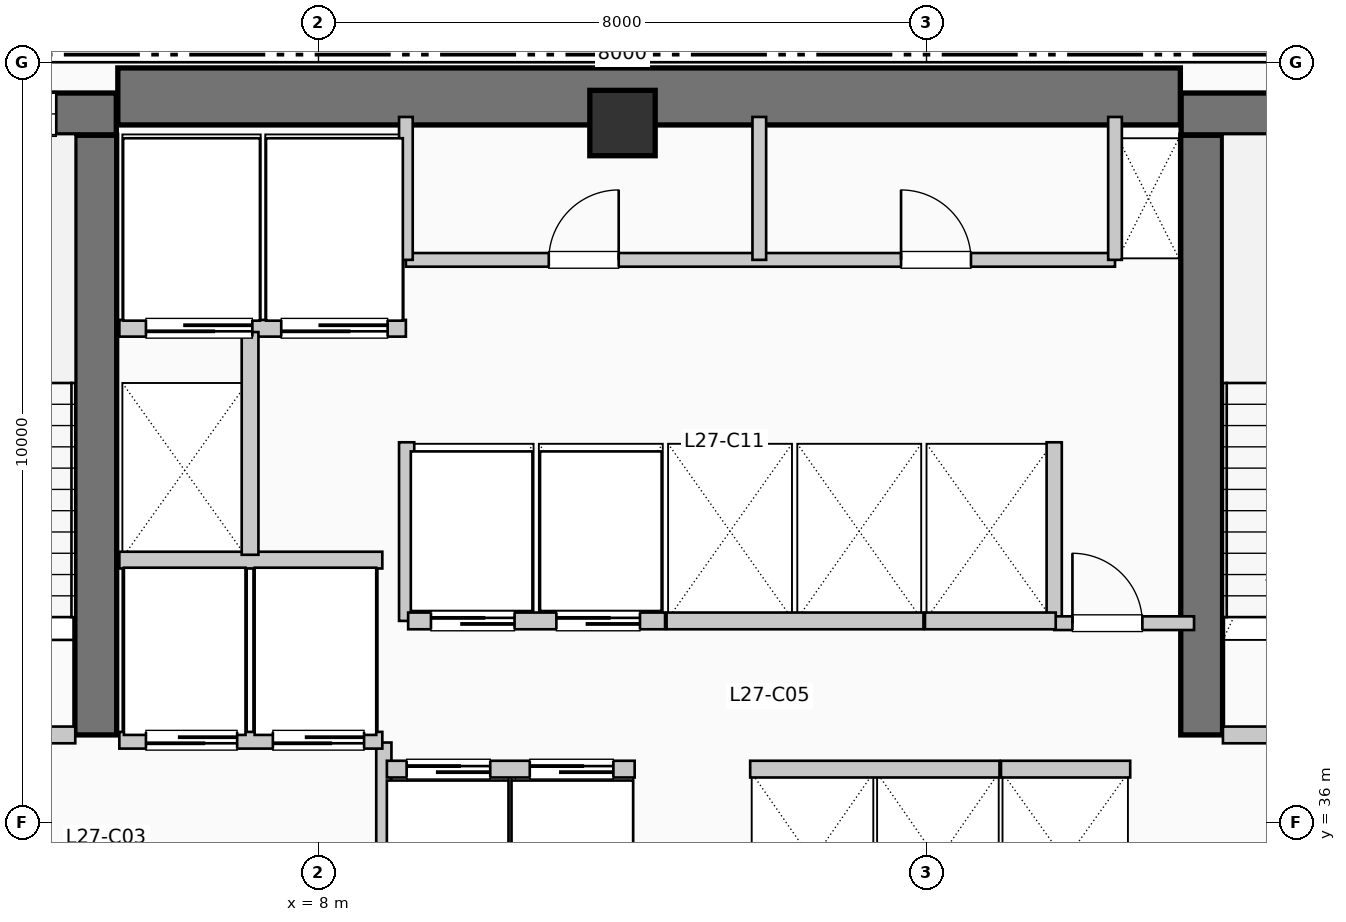
"""IFC4 building model, lengths in metres.
Left out: names, types, materials, properties, quantities, classifications, styles, units other than length and angle.
Written with IfcOpenShell. Run it as: python <this file> out.ifc"""

import sys

from ifc_helpers import new_model, si_unit, direction, frame, frame_2d, origin, origin_2d, place, context, subcontext, project, spatial, rectangle, extrude, element, fill, save


model = new_model("IFC4")
c1 = context("Model", 3, precision=1e-05, world=origin(), true_north=direction((0.0, 1.0)))
c2 = subcontext(c1, "Body", "Model", "MODEL_VIEW")
j1 = project(units=[si_unit("LENGTHUNIT", "METRE"), si_unit("PLANEANGLEUNIT", "RADIAN")], contexts=[c1])
p1 = place(None, origin())
s1 = spatial("IfcSite", under=j1, at=p1, CompositionType="ELEMENT")
p2 = place(p1, origin())
s2 = spatial("IfcBuilding", under=s1, at=p2, CompositionType="ELEMENT")
p3 = place(p2, frame((0.0, 0.0, 114.51)))
s3 = spatial("IfcBuildingStorey", under=s2, at=p3, CompositionType="ELEMENT", Elevation=114.51)
p4 = place(p3, frame((5.36, 45.55, 0.0), z_axis=(0.0, 0.0, 1.0), x_axis=(1.0, 0.0, 0.0)))
e1 = element("IfcWall", 1, at=p4, inside=s3, PredefinedType="SHEAR", context=c2, shape_type="SweptSolid", body=[
    extrude(rectangle(XDim=13.98, YDim=0.75, at=frame_2d((6.99, 0.0))), origin(), (0.0, 0.0, 1.0), 3.96),
])
p5 = place(p3, frame((5.07, 37.15, 0.0), z_axis=(0.0, 0.0, 1.0), x_axis=(0.0, 1.0, 0.0)))
e2 = element("IfcWall", 2, at=p5, inside=s3, PredefinedType="SHEAR", context=c2, shape_type="SweptSolid", body=[
    extrude(rectangle(XDim=7.89, YDim=0.55, at=frame_2d((3.945, 0.0))), origin(), (0.0, 0.0, 1.0), 3.96),
])
p6 = place(p3, frame((1.1, 45.32, 0.0), z_axis=(0.0, 0.0, 1.0), x_axis=(1.0, 0.0, 0.0)))
e3 = element("IfcWall", 3, at=p6, inside=s3, PredefinedType="SHEAR", context=c2, shape_type="SweptSolid", body=[
    extrude(rectangle(XDim=4.24, YDim=0.55, at=frame_2d((2.12, 0.0))), origin(), (0.0, 0.0, 1.0), 3.96),
])
p7 = place(p6, frame((2.05, 0.0, 1.05)))
e4 = element("IfcOpeningElement", 4, at=p7, cuts=e3, PredefinedType="OPENING", context=c2, shape_type="SweptSolid", body=[
    extrude(rectangle(XDim=1.4, YDim=1.8, at=frame_2d((0.7, 0.9))), frame((0.0, 0.285, 0.0), z_axis=(0.0, -1.0, 0.0), x_axis=(1.0, 0.0, 0.0)), (0.0, 0.0, 1.0), 0.57),
])
p8 = place(p3, frame((19.62, 37.15, 0.0), z_axis=(0.0, 0.0, 1.0), x_axis=(0.0, 1.0, 0.0)))
e5 = element("IfcWall", 5, at=p8, inside=s3, PredefinedType="SHEAR", context=c2, shape_type="SweptSolid", body=[
    extrude(rectangle(XDim=7.89, YDim=0.55, at=frame_2d((3.945, 0.0))), origin(), (0.0, 0.0, 1.0), 3.96),
])
p9 = place(p3, frame((19.35, 45.32, 0.0), z_axis=(0.0, 0.0, 1.0), x_axis=(1.0, 0.0, 0.0)))
e6 = element("IfcWall", 6, at=p9, inside=s3, PredefinedType="SHEAR", context=c2, shape_type="SweptSolid", body=[
    extrude(rectangle(XDim=3.69, YDim=0.55, at=frame_2d((1.845, 0.0))), origin(), (0.0, 0.0, 1.0), 3.96),
])
p10 = place(p9, frame((1.15, 0.0, 1.05)))
e7 = element("IfcOpeningElement", 7, at=p10, cuts=e6, PredefinedType="OPENING", context=c2, shape_type="SweptSolid", body=[
    extrude(rectangle(XDim=1.4, YDim=1.8, at=frame_2d((0.7, 0.9))), frame((0.0, 0.285, 0.0), z_axis=(0.0, -1.0, 0.0), x_axis=(1.0, 0.0, 0.0)), (0.0, 0.0, 1.0), 0.57),
])
p11 = place(p3, frame((12.0, 45.2, 0.0), z_axis=(0.0, 0.0, 1.0), x_axis=(1.0, 0.0, 0.0)))
e8 = element("IfcColumn", 8, at=p11, inside=s3, PredefinedType="COLUMN", context=c2, shape_type="SweptSolid", body=[
    extrude(rectangle(XDim=0.86, YDim=0.86, at=origin_2d()), origin(), (0.0, 0.0, 1.0), 3.96),
])
p12 = place(p3, frame((1.65, 37.15, 0.0), z_axis=(0.0, 0.0, 1.0), x_axis=(1.0, 0.0, 0.0)))
e9 = element("IfcWall", 9, at=p12, inside=s3, PredefinedType="PARTITIONING", context=c2, shape_type="SweptSolid", body=[
    extrude(rectangle(XDim=3.15, YDim=0.22, at=frame_2d((1.575, 0.0))), origin(), (0.0, 0.0, 1.0), 3.71),
])
p13 = place(p12, frame((2.05, 0.0, 0.0), z_axis=(0.0, 0.0, 1.0), x_axis=(-1.0, 0.0, 0.0)))
e10 = element("IfcOpeningElement", 10, at=p13, cuts=e9, PredefinedType="OPENING", context=c2, shape_type="SweptSolid", body=[
    extrude(rectangle(XDim=1.05, YDim=2.15, at=frame_2d((0.525, 1.075))), frame((0.0, 0.12, 0.0), z_axis=(0.0, -1.0, 0.0), x_axis=(1.0, 0.0, 0.0)), (0.0, 0.0, 1.0), 0.24),
])
p14 = place(p3, frame((8.86, 34.55, 0.0), z_axis=(0.0, 0.0, 1.0), x_axis=(0.0, 1.0, 0.0)))
e11 = element("IfcWall", 11, at=p14, inside=s3, PredefinedType="PARTITIONING", context=c2, shape_type="SweptSolid", body=[
    extrude(rectangle(XDim=2.5, YDim=0.2, at=frame_2d((1.25, 0.0))), origin(), (0.0, 0.0, 1.0), 3.71),
])
p15 = place(p3, frame((19.9, 37.15, 0.0), z_axis=(0.0, 0.0, 1.0), x_axis=(1.0, 0.0, 0.0)))
e12 = element("IfcWall", 12, at=p15, inside=s3, PredefinedType="PARTITIONING", context=c2, shape_type="SweptSolid", body=[
    extrude(rectangle(XDim=3.15, YDim=0.22, at=frame_2d((1.575, 0.0))), origin(), (0.0, 0.0, 1.0), 3.71),
])
p16 = place(p15, frame((2.05, 0.0, 0.0), z_axis=(0.0, 0.0, 1.0), x_axis=(-1.0, 0.0, 0.0)))
e13 = element("IfcOpeningElement", 13, at=p16, cuts=e12, PredefinedType="OPENING", context=c2, shape_type="SweptSolid", body=[
    extrude(rectangle(XDim=1.05, YDim=2.15, at=frame_2d((0.525, 1.075))), frame((0.0, 0.12, 0.0), z_axis=(0.0, -1.0, 0.0), x_axis=(1.0, 0.0, 0.0)), (0.0, 0.0, 1.0), 0.24),
])
p17 = place(p3, frame((5.38, 37.08, 0.0), z_axis=(0.0, 0.0, 1.0), x_axis=(1.0, 0.0, 0.0)))
e14 = element("IfcWall", 14, at=p17, inside=s3, PredefinedType="PARTITIONING", context=c2, shape_type="SweptSolid", body=[
    extrude(rectangle(XDim=3.46, YDim=0.22, at=frame_2d((1.73, 0.0))), origin(), (0.0, 0.0, 1.0), 3.71),
])
p18 = place(p17, frame((1.55, 0.0, 0.0), z_axis=(0.0, 0.0, 1.0), x_axis=(-1.0, 0.0, 0.0)))
e15 = element("IfcOpeningElement", 15, at=p18, cuts=e14, PredefinedType="OPENING", context=c2, shape_type="SweptSolid", body=[
    extrude(rectangle(XDim=1.2, YDim=2.2, at=frame_2d((0.6, 1.1))), frame((0.0, 0.12, 0.0), z_axis=(0.0, -1.0, 0.0), x_axis=(1.0, 0.0, 0.0)), (0.0, 0.0, 1.0), 0.24),
])
p19 = place(p17, frame((3.22, 0.0, 0.0), z_axis=(0.0, 0.0, 1.0), x_axis=(-1.0, 0.0, 0.0)))
e16 = element("IfcOpeningElement", 16, at=p19, cuts=e14, PredefinedType="OPENING", context=c2, shape_type="SweptSolid", body=[
    extrude(rectangle(XDim=1.2, YDim=2.2, at=frame_2d((0.6, 1.1))), frame((0.0, 0.12, 0.0), z_axis=(0.0, -1.0, 0.0), x_axis=(1.0, 0.0, 0.0)), (0.0, 0.0, 1.0), 0.24),
])
p20 = place(p3, frame((5.38, 39.45, 0.0), z_axis=(0.0, 0.0, 1.0), x_axis=(1.0, 0.0, 0.0)))
e17 = element("IfcWall", 17, at=p20, inside=s3, PredefinedType="PARTITIONING", context=c2, shape_type="SweptSolid", body=[
    extrude(rectangle(XDim=3.46, YDim=0.22, at=frame_2d((1.73, 0.0))), origin(), (0.0, 0.0, 1.0), 3.71),
])
p21 = place(p3, frame((5.38, 42.5, 0.0), z_axis=(0.0, 0.0, 1.0), x_axis=(1.0, 0.0, 0.0)))
e18 = element("IfcWall", 18, at=p21, inside=s3, PredefinedType="PARTITIONING", context=c2, shape_type="SweptSolid", body=[
    extrude(rectangle(XDim=3.77, YDim=0.22, at=frame_2d((1.885, 0.0))), origin(), (0.0, 0.0, 1.0), 3.71),
])
p22 = place(p21, frame((1.75, 0.0, 0.0), z_axis=(0.0, 0.0, 1.0), x_axis=(-1.0, 0.0, 0.0)))
e19 = element("IfcOpeningElement", 19, at=p22, cuts=e18, PredefinedType="OPENING", context=c2, shape_type="SweptSolid", body=[
    extrude(rectangle(XDim=1.4, YDim=2.2, at=frame_2d((0.7, 1.1))), frame((0.0, 0.12, 0.0), z_axis=(0.0, -1.0, 0.0), x_axis=(1.0, 0.0, 0.0)), (0.0, 0.0, 1.0), 0.24),
])
p23 = place(p21, frame((3.53, 0.0, 0.0), z_axis=(0.0, 0.0, 1.0), x_axis=(-1.0, 0.0, 0.0)))
e20 = element("IfcOpeningElement", 20, at=p23, cuts=e18, PredefinedType="OPENING", context=c2, shape_type="SweptSolid", body=[
    extrude(rectangle(XDim=1.4, YDim=2.2, at=frame_2d((0.7, 1.1))), frame((0.0, 0.12, 0.0), z_axis=(0.0, -1.0, 0.0), x_axis=(1.0, 0.0, 0.0)), (0.0, 0.0, 1.0), 0.24),
])
p24 = place(p3, frame((7.1, 39.52, 0.0), z_axis=(0.0, 0.0, 1.0), x_axis=(0.0, 1.0, 0.0)))
e21 = element("IfcWall", 21, at=p24, inside=s3, PredefinedType="PARTITIONING", context=c2, shape_type="SweptSolid", body=[
    extrude(rectangle(XDim=2.93, YDim=0.22, at=frame_2d((1.465, 0.0))), origin(), (0.0, 0.0, 1.0), 3.71),
])
for number, where, z_axis, x_axis in (
    (22, (9.16, 38.65, 0.0), (0.0, 0.0, 1.0), (0.0, 1.0, 0.0)),
    (23, (17.68, 38.65, 0.0), (0.0, 0.0, 1.0), (0.0, 1.0, 0.0)),
):
    element("IfcWall", number, at=place(p3, frame(where, z_axis=z_axis, x_axis=x_axis)), inside=s3, PredefinedType="PARTITIONING", context=c2, shape_type="SweptSolid", body=[
        extrude(rectangle(XDim=2.35, YDim=0.2, at=frame_2d((1.175, 0.0))), origin(), (0.0, 0.0, 1.0), 3.71),
    ])
p25 = place(p3, frame((17.68, 38.62, 0.0), z_axis=(0.0, 0.0, 1.0), x_axis=(1.0, 0.0, 0.0)))
e24 = element("IfcWall", 24, at=p25, inside=s3, PredefinedType="PARTITIONING", context=c2, shape_type="SweptSolid", body=[
    extrude(rectangle(XDim=1.84, YDim=0.18, at=frame_2d((0.92, 0.0))), origin(), (0.0, 0.0, 1.0), 3.71),
])
p26 = place(p25, frame((0.24, 0.0, 0.0)))
e25 = element("IfcOpeningElement", 25, at=p26, cuts=e24, PredefinedType="OPENING", context=c2, shape_type="SweptSolid", body=[
    extrude(rectangle(XDim=0.92, YDim=2.1, at=frame_2d((0.46, 1.05))), frame((0.0, 0.1, 0.0), z_axis=(0.0, -1.0, 0.0), x_axis=(1.0, 0.0, 0.0)), (0.0, 0.0, 1.0), 0.2),
])
p27 = place(p3, frame((8.9, 36.7, 0.0), z_axis=(0.0, 0.0, 1.0), x_axis=(1.0, 0.0, 0.0)))
e26 = element("IfcWall", 26, at=p27, inside=s3, PredefinedType="PARTITIONING", context=c2, shape_type="SweptSolid", body=[
    extrude(rectangle(XDim=3.26, YDim=0.22, at=frame_2d((1.63, 0.0))), origin(), (0.0, 0.0, 1.0), 3.71),
])
p28 = place(p27, frame((0.26, 0.0, 0.0)))
e27 = element("IfcOpeningElement", 27, at=p28, cuts=e26, PredefinedType="OPENING", context=c2, shape_type="SweptSolid", body=[
    extrude(rectangle(XDim=1.1, YDim=2.2, at=frame_2d((0.55, 1.1))), frame((0.0, 0.12, 0.0), z_axis=(0.0, -1.0, 0.0), x_axis=(1.0, 0.0, 0.0)), (0.0, 0.0, 1.0), 0.24),
])
p29 = place(p27, frame((1.88, 0.0, 0.0)))
e28 = element("IfcOpeningElement", 28, at=p29, cuts=e26, PredefinedType="OPENING", context=c2, shape_type="SweptSolid", body=[
    extrude(rectangle(XDim=1.1, YDim=2.2, at=frame_2d((0.55, 1.1))), frame((0.0, 0.12, 0.0), z_axis=(0.0, -1.0, 0.0), x_axis=(1.0, 0.0, 0.0)), (0.0, 0.0, 1.0), 0.24),
])
p30 = place(p3, frame((9.18, 38.65, 0.0), z_axis=(0.0, 0.0, 1.0), x_axis=(1.0, 0.0, 0.0)))
e29 = element("IfcWall", 29, at=p30, inside=s3, PredefinedType="PARTITIONING", context=c2, shape_type="SweptSolid", body=[
    extrude(rectangle(XDim=3.38, YDim=0.22, at=frame_2d((1.69, 0.0))), origin(), (0.0, 0.0, 1.0), 3.71),
])
p31 = place(p30, frame((0.3, 0.0, 0.0)))
e30 = element("IfcOpeningElement", 30, at=p31, cuts=e29, PredefinedType="OPENING", context=c2, shape_type="SweptSolid", body=[
    extrude(rectangle(XDim=1.1, YDim=2.2, at=frame_2d((0.55, 1.1))), frame((0.0, 0.12, 0.0), z_axis=(0.0, -1.0, 0.0), x_axis=(1.0, 0.0, 0.0)), (0.0, 0.0, 1.0), 0.24),
])
p32 = place(p30, frame((1.95, 0.0, 0.0)))
e31 = element("IfcOpeningElement", 31, at=p32, cuts=e29, PredefinedType="OPENING", context=c2, shape_type="SweptSolid", body=[
    extrude(rectangle(XDim=1.1, YDim=2.2, at=frame_2d((0.55, 1.1))), frame((0.0, 0.12, 0.0), z_axis=(0.0, -1.0, 0.0), x_axis=(1.0, 0.0, 0.0)), (0.0, 0.0, 1.0), 0.24),
])
p33 = place(p3, frame((13.68, 36.7, 0.0), z_axis=(0.0, 0.0, 1.0), x_axis=(1.0, 0.0, 0.0)))
e32 = element("IfcWall", 32, at=p33, inside=s3, PredefinedType="PARTITIONING", context=c2, shape_type="SweptSolid", body=[
    extrude(rectangle(XDim=3.28, YDim=0.22, at=frame_2d((1.64, 0.0))), origin(), (0.0, 0.0, 1.0), 3.71),
])
p34 = place(p3, frame((12.58, 38.65, 0.0), z_axis=(0.0, 0.0, 1.0), x_axis=(1.0, 0.0, 0.0)))
e33 = element("IfcWall", 33, at=p34, inside=s3, PredefinedType="PARTITIONING", context=c2, shape_type="SweptSolid", body=[
    extrude(rectangle(XDim=3.38, YDim=0.22, at=frame_2d((1.69, 0.0))), origin(), (0.0, 0.0, 1.0), 3.71),
])
p35 = place(p3, frame((16.98, 36.7, 0.0), z_axis=(0.0, 0.0, 1.0), x_axis=(1.0, 0.0, 0.0)))
e34 = element("IfcWall", 34, at=p35, inside=s3, PredefinedType="PARTITIONING", context=c2, shape_type="SweptSolid", body=[
    extrude(rectangle(XDim=1.7, YDim=0.22, at=frame_2d((0.85, 0.0))), origin(), (0.0, 0.0, 1.0), 3.71),
])
p36 = place(p3, frame((15.98, 38.65, 0.0), z_axis=(0.0, 0.0, 1.0), x_axis=(1.0, 0.0, 0.0)))
e35 = element("IfcWall", 35, at=p36, inside=s3, PredefinedType="PARTITIONING", context=c2, shape_type="SweptSolid", body=[
    extrude(rectangle(XDim=1.72, YDim=0.22, at=frame_2d((0.86, 0.0))), origin(), (0.0, 0.0, 1.0), 3.71),
])
p37 = place(p3, frame((9.15, 43.4, 0.0), z_axis=(0.0, 0.0, 1.0), x_axis=(1.0, 0.0, 0.0)))
e36 = element("IfcWall", 36, at=p37, inside=s3, PredefinedType="PLUMBINGWALL", context=c2, shape_type="SweptSolid", body=[
    extrude(rectangle(XDim=9.33, YDim=0.18, at=frame_2d((4.665, 0.0))), origin(), (0.0, 0.0, 1.0), 3.71),
])
p38 = place(p37, frame((1.88, 0.0, 0.0)))
e37 = element("IfcOpeningElement", 37, at=p38, cuts=e36, PredefinedType="OPENING", context=c2, shape_type="SweptSolid", body=[
    extrude(rectangle(XDim=0.92, YDim=2.1, at=frame_2d((0.46, 1.05))), frame((0.0, 0.1, 0.0), z_axis=(0.0, -1.0, 0.0), x_axis=(1.0, 0.0, 0.0)), (0.0, 0.0, 1.0), 0.2),
])
p39 = place(p37, frame((6.515, 0.0, 0.0)))
e38 = element("IfcOpeningElement", 38, at=p39, cuts=e36, PredefinedType="OPENING", context=c2, shape_type="SweptSolid", body=[
    extrude(rectangle(XDim=0.92, YDim=2.1, at=frame_2d((0.46, 1.05))), frame((0.0, 0.1, 0.0), z_axis=(0.0, -1.0, 0.0), x_axis=(1.0, 0.0, 0.0)), (0.0, 0.0, 1.0), 0.2),
])
for number, where, z_axis, x_axis in (
    (39, (9.15, 43.4, 0.0), (0.0, 0.0, 1.0), (0.0, 1.0, 0.0)),
    (40, (18.48, 43.4, 0.0), (0.0, 0.0, 1.0), (0.0, 1.0, 0.0)),
    (41, (13.8, 43.4, 0.0), (0.0, 0.0, 1.0), (0.0, 1.0, 0.0)),
):
    element("IfcWall", number, at=place(p3, frame(where, z_axis=z_axis, x_axis=x_axis)), inside=s3, PredefinedType="PLUMBINGWALL", context=c2, shape_type="SweptSolid", body=[
        extrude(rectangle(XDim=1.88, YDim=0.18, at=frame_2d((0.94, 0.0))), origin(), (0.0, 0.0, 1.0), 3.71),
    ])
p40 = place(p7, origin())
e42 = element("IfcWindow", 42, at=p40, inside=s3, PartitioningType="SINGLE_PANEL", PredefinedType="WINDOW", context=c2, shape_type="SweptSolid", body=[
    extrude(rectangle(XDim=1.4, YDim=1.8, at=frame_2d((0.7, 0.9))), frame((0.0, 0.03, 0.0), z_axis=(0.0, -1.0, 0.0), x_axis=(1.0, 0.0, 0.0)), (0.0, 0.0, 1.0), 0.06),
])
fill(e4, e42)
p41 = place(p18, origin())
e43 = element("IfcDoor", 43, at=p41, inside=s3, OperationType="SLIDING_TO_RIGHT", PredefinedType="DOOR", context=c2, shape_type="SweptSolid", body=[
    extrude(rectangle(XDim=1.2, YDim=2.2, at=frame_2d((0.6, 1.1))), frame((0.0, 0.025, 0.0), z_axis=(0.0, -1.0, 0.0), x_axis=(1.0, 0.0, 0.0)), (0.0, 0.0, 1.0), 0.05),
])
fill(e15, e43)
p42 = place(p19, origin())
e44 = element("IfcDoor", 44, at=p42, inside=s3, OperationType="SLIDING_TO_RIGHT", PredefinedType="DOOR", context=c2, shape_type="SweptSolid", body=[
    extrude(rectangle(XDim=1.2, YDim=2.2, at=frame_2d((0.6, 1.1))), frame((0.0, 0.025, 0.0), z_axis=(0.0, -1.0, 0.0), x_axis=(1.0, 0.0, 0.0)), (0.0, 0.0, 1.0), 0.05),
])
fill(e16, e44)
p43 = place(p22, origin())
e45 = element("IfcDoor", 45, at=p43, inside=s3, OperationType="SLIDING_TO_LEFT", PredefinedType="DOOR", context=c2, shape_type="SweptSolid", body=[
    extrude(rectangle(XDim=1.4, YDim=2.2, at=frame_2d((0.7, 1.1))), frame((0.0, 0.025, 0.0), z_axis=(0.0, -1.0, 0.0), x_axis=(1.0, 0.0, 0.0)), (0.0, 0.0, 1.0), 0.05),
])
fill(e19, e45)
p44 = place(p23, origin())
e46 = element("IfcDoor", 46, at=p44, inside=s3, OperationType="SLIDING_TO_LEFT", PredefinedType="DOOR", context=c2, shape_type="SweptSolid", body=[
    extrude(rectangle(XDim=1.4, YDim=2.2, at=frame_2d((0.7, 1.1))), frame((0.0, 0.025, 0.0), z_axis=(0.0, -1.0, 0.0), x_axis=(1.0, 0.0, 0.0)), (0.0, 0.0, 1.0), 0.05),
])
fill(e20, e46)
p45 = place(p26, origin())
e47 = element("IfcDoor", 47, at=p45, inside=s3, OperationType="SINGLE_SWING_LEFT", PredefinedType="DOOR", context=c2, shape_type="SweptSolid", body=[
    extrude(rectangle(XDim=0.92, YDim=2.1, at=frame_2d((0.46, 1.05))), frame((0.0, 0.025, 0.0), z_axis=(0.0, -1.0, 0.0), x_axis=(1.0, 0.0, 0.0)), (0.0, 0.0, 1.0), 0.05),
])
fill(e25, e47)
p46 = place(p28, origin())
e48 = element("IfcDoor", 48, at=p46, inside=s3, OperationType="SLIDING_TO_LEFT", PredefinedType="DOOR", context=c2, shape_type="SweptSolid", body=[
    extrude(rectangle(XDim=1.1, YDim=2.2, at=frame_2d((0.55, 1.1))), frame((0.0, 0.025, 0.0), z_axis=(0.0, -1.0, 0.0), x_axis=(1.0, 0.0, 0.0)), (0.0, 0.0, 1.0), 0.05),
])
fill(e27, e48)
p47 = place(p29, origin())
e49 = element("IfcDoor", 49, at=p47, inside=s3, OperationType="SLIDING_TO_LEFT", PredefinedType="DOOR", context=c2, shape_type="SweptSolid", body=[
    extrude(rectangle(XDim=1.1, YDim=2.2, at=frame_2d((0.55, 1.1))), frame((0.0, 0.025, 0.0), z_axis=(0.0, -1.0, 0.0), x_axis=(1.0, 0.0, 0.0)), (0.0, 0.0, 1.0), 0.05),
])
fill(e28, e49)
p48 = place(p31, origin())
e50 = element("IfcDoor", 50, at=p48, inside=s3, OperationType="SLIDING_TO_LEFT", PredefinedType="DOOR", context=c2, shape_type="SweptSolid", body=[
    extrude(rectangle(XDim=1.1, YDim=2.2, at=frame_2d((0.55, 1.1))), frame((0.0, 0.025, 0.0), z_axis=(0.0, -1.0, 0.0), x_axis=(1.0, 0.0, 0.0)), (0.0, 0.0, 1.0), 0.05),
])
fill(e30, e50)
p49 = place(p32, origin())
e51 = element("IfcDoor", 51, at=p49, inside=s3, OperationType="SLIDING_TO_LEFT", PredefinedType="DOOR", context=c2, shape_type="SweptSolid", body=[
    extrude(rectangle(XDim=1.1, YDim=2.2, at=frame_2d((0.55, 1.1))), frame((0.0, 0.025, 0.0), z_axis=(0.0, -1.0, 0.0), x_axis=(1.0, 0.0, 0.0)), (0.0, 0.0, 1.0), 0.05),
])
fill(e31, e51)
p50 = place(p38, origin())
e52 = element("IfcDoor", 52, at=p50, inside=s3, OperationType="SINGLE_SWING_RIGHT", PredefinedType="DOOR", context=c2, shape_type="SweptSolid", body=[
    extrude(rectangle(XDim=0.92, YDim=2.1, at=frame_2d((0.46, 1.05))), frame((0.0, 0.025, 0.0), z_axis=(0.0, -1.0, 0.0), x_axis=(1.0, 0.0, 0.0)), (0.0, 0.0, 1.0), 0.05),
])
fill(e37, e52)
p51 = place(p39, origin())
e53 = element("IfcDoor", 53, at=p51, inside=s3, OperationType="SINGLE_SWING_LEFT", PredefinedType="DOOR", context=c2, shape_type="SweptSolid", body=[
    extrude(rectangle(XDim=0.92, YDim=2.1, at=frame_2d((0.46, 1.05))), frame((0.0, 0.025, 0.0), z_axis=(0.0, -1.0, 0.0), x_axis=(1.0, 0.0, 0.0)), (0.0, 0.0, 1.0), 0.05),
])
fill(e38, e53)
save(model, sys.argv[1])
